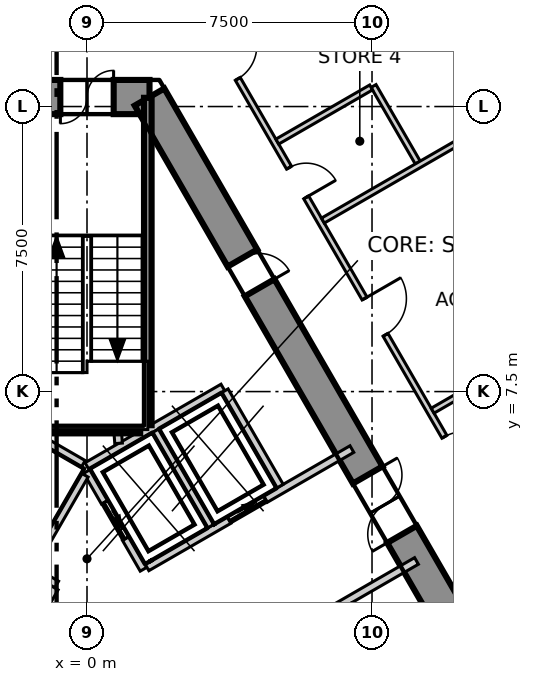
"""IFC4 building model, lengths in metres.
Left out: names, types, materials, properties, quantities, classifications, styles, units other than length and angle.
Written with IfcOpenShell. Run it as: python <this file> out.ifc"""

import sys

from ifc_helpers import new_model, si_unit, direction, frame, frame_2d, origin, place, context, subcontext, project, spatial, polyline, rectangle, outline, extrude, element, fill, save


model = new_model("IFC4")
c1 = context("Model", 3, precision=1e-05, world=origin(), true_north=direction((0.0, 1.0)))
c2 = subcontext(c1, "Body", "Model", "MODEL_VIEW")
j1 = project(units=[si_unit("LENGTHUNIT", "METRE"), si_unit("PLANEANGLEUNIT", "RADIAN")], contexts=[c1])
p1 = place(None, origin())
s1 = spatial("IfcSite", under=j1, at=p1, CompositionType="ELEMENT")
p2 = place(p1, origin())
s2 = spatial("IfcBuilding", under=s1, at=p2, CompositionType="ELEMENT")
p3 = place(p2, frame((0.0, 0.0, 71.3)))
s3 = spatial("IfcBuildingStorey", under=s2, at=p3, CompositionType="ELEMENT", Elevation=71.3)
p4 = place(p3, frame((1.645, 15.25, -0.3), z_axis=(0.0, 0.0, 1.0), x_axis=(-1.0, 0.0, 0.0)))
e1 = element("IfcWall", 1, at=p4, inside=s3, PredefinedType="SHEAR", context=c2, shape_type="SweptSolid", body=[
    extrude(outline(polyline([(-0.26, -0.45), (1.645, -0.45), (3.55, -0.45), (3.031, 0.45), (1.645, 0.45), (0.259, 0.45), (-0.26, -0.45)])), origin(), (0.0, 0.0, 1.0), 4.0),
])
p5 = place(p4, frame((0.945, 0.0, 0.3)))
e2 = element("IfcOpeningElement", 2, at=p5, cuts=e1, PredefinedType="OPENING", context=c2, shape_type="SweptSolid", body=[
    extrude(rectangle(XDim=1.4, YDim=2.1, at=frame_2d((0.7, 1.05))), frame((0.0, 0.46, 0.0), z_axis=(0.0, -1.0, 0.0), x_axis=(1.0, 0.0, 0.0)), (0.0, 0.0, 1.0), 0.92),
])
p6 = place(p3, frame((14.03, -6.2, -0.3), z_axis=(0.0, 0.0, 1.0), x_axis=(-0.500026485275, 0.866010111964, 0.0)))
e3 = element("IfcWall", 3, at=p6, inside=s3, PredefinedType="SHEAR", context=c2, shape_type="SweptSolid", body=[
    extrude(outline(polyline([(-0.26, -0.449), (1.685, -0.449), (3.63, -0.449), (5.576, -0.449), (7.521, -0.449), (9.466, -0.449), (11.411, -0.449), (13.357, -0.449), (15.302, -0.449), (17.247, -0.45), (19.192, -0.45), (21.138, -0.45), (23.083, -0.45), (25.028, -0.45), (24.509, 0.449), (22.644, 0.449), (20.778, 0.449), (18.913, 0.449), (17.048, 0.449), (15.182, 0.449), (13.317, 0.449), (11.452, 0.449), (9.587, 0.449), (7.721, 0.45), (5.856, 0.45), (3.991, 0.45), (2.125, 0.45), (0.26, 0.45), (-0.26, -0.449)])), origin(), (0.0, 0.0, 1.0), 4.0),
])
p7 = place(p6, frame((11.484, 0.0, 0.3)))
e4 = element("IfcOpeningElement", 4, at=p7, cuts=e3, PredefinedType="OPENING", context=c2, shape_type="SweptSolid", body=[
    extrude(rectangle(XDim=1.8, YDim=2.1, at=frame_2d((0.9, 1.05))), frame((0.0, 0.46, 0.0), z_axis=(0.0, -1.0, 0.0), x_axis=(1.0, 0.0, 0.0)), (0.0, 0.0, 1.0), 0.92),
])
p8 = place(p6, frame((4.892, 0.0, 0.3)))
e5 = element("IfcOpeningElement", 5, at=p8, cuts=e3, PredefinedType="OPENING", context=c2, shape_type="SweptSolid", body=[
    extrude(rectangle(XDim=0.9, YDim=2.1, at=frame_2d((0.45, 1.05))), frame((0.0, 0.46, 0.0), z_axis=(0.0, -1.0, 0.0), x_axis=(1.0, 0.0, 0.0)), (0.0, 0.0, 1.0), 0.92),
])
p9 = place(p6, frame((18.976, 0.0, 0.3)))
e6 = element("IfcOpeningElement", 6, at=p9, cuts=e3, PredefinedType="OPENING", context=c2, shape_type="SweptSolid", body=[
    extrude(rectangle(XDim=0.9, YDim=2.1, at=frame_2d((0.45, 1.05))), frame((0.0, 0.46, 0.0), z_axis=(0.0, -1.0, 0.0), x_axis=(1.0, 0.0, 0.0)), (0.0, 0.0, 1.0), 0.92),
])
p10 = place(p3, frame((33.779, -15.662, 0.0), z_axis=(0.0, 0.0, 1.0), x_axis=(-0.500000131003, 0.86602532815, 0.0)))
e7 = element("IfcWall", 7, at=p10, inside=s3, PredefinedType="ELEMENTEDWALL", context=c2, shape_type="SweptSolid", body=[
    extrude(rectangle(XDim=60.886, YDim=0.2, at=frame_2d((30.443, 0.0))), origin(), (0.0, 0.0, 1.0), 3.7),
])
p11 = place(p10, frame((2.147, 0.0, 0.9)))
e8 = element("IfcOpeningElement", 8, at=p11, cuts=e7, PredefinedType="OPENING", context=c2, shape_type="SweptSolid", body=[
    extrude(rectangle(XDim=5.6, YDim=2.5, at=frame_2d((2.8, 1.25))), frame((0.0, 0.11, 0.0), z_axis=(0.0, -1.0, 0.0), x_axis=(1.0, 0.0, 0.0)), (0.0, 0.0, 1.0), 0.22),
])
p12 = place(p10, frame((9.434, 0.0, 0.9)))
e9 = element("IfcOpeningElement", 9, at=p12, cuts=e7, PredefinedType="OPENING", context=c2, shape_type="SweptSolid", body=[
    extrude(rectangle(XDim=5.6, YDim=2.5, at=frame_2d((2.8, 1.25))), frame((0.0, 0.11, 0.0), z_axis=(0.0, -1.0, 0.0), x_axis=(1.0, 0.0, 0.0)), (0.0, 0.0, 1.0), 0.22),
])
p13 = place(p10, frame((16.722, 0.0, 0.9)))
e10 = element("IfcOpeningElement", 10, at=p13, cuts=e7, PredefinedType="OPENING", context=c2, shape_type="SweptSolid", body=[
    extrude(rectangle(XDim=5.6, YDim=2.5, at=frame_2d((2.8, 1.25))), frame((0.0, 0.11, 0.0), z_axis=(0.0, -1.0, 0.0), x_axis=(1.0, 0.0, 0.0)), (0.0, 0.0, 1.0), 0.22),
])
p14 = place(p10, frame((24.009, 0.0, 0.9)))
e11 = element("IfcOpeningElement", 11, at=p14, cuts=e7, PredefinedType="OPENING", context=c2, shape_type="SweptSolid", body=[
    extrude(rectangle(XDim=5.6, YDim=2.5, at=frame_2d((2.8, 1.25))), frame((0.0, 0.11, 0.0), z_axis=(0.0, -1.0, 0.0), x_axis=(1.0, 0.0, 0.0)), (0.0, 0.0, 1.0), 0.22),
])
p15 = place(p10, frame((31.297, 0.0, 0.9)))
e12 = element("IfcOpeningElement", 12, at=p15, cuts=e7, PredefinedType="OPENING", context=c2, shape_type="SweptSolid", body=[
    extrude(rectangle(XDim=5.6, YDim=2.5, at=frame_2d((2.8, 1.25))), frame((0.0, 0.11, 0.0), z_axis=(0.0, -1.0, 0.0), x_axis=(1.0, 0.0, 0.0)), (0.0, 0.0, 1.0), 0.22),
])
p16 = place(p10, frame((38.584, 0.0, 0.9)))
e13 = element("IfcOpeningElement", 13, at=p16, cuts=e7, PredefinedType="OPENING", context=c2, shape_type="SweptSolid", body=[
    extrude(rectangle(XDim=5.6, YDim=2.5, at=frame_2d((2.8, 1.25))), frame((0.0, 0.11, 0.0), z_axis=(0.0, -1.0, 0.0), x_axis=(1.0, 0.0, 0.0)), (0.0, 0.0, 1.0), 0.22),
])
p17 = place(p10, frame((45.872, 0.0, 0.9)))
e14 = element("IfcOpeningElement", 14, at=p17, cuts=e7, PredefinedType="OPENING", context=c2, shape_type="SweptSolid", body=[
    extrude(rectangle(XDim=5.6, YDim=2.5, at=frame_2d((2.8, 1.25))), frame((0.0, 0.11, 0.0), z_axis=(0.0, -1.0, 0.0), x_axis=(1.0, 0.0, 0.0)), (0.0, 0.0, 1.0), 0.22),
])
p18 = place(p10, frame((53.16, 0.0, 0.9)))
e15 = element("IfcOpeningElement", 15, at=p18, cuts=e7, PredefinedType="OPENING", context=c2, shape_type="SweptSolid", body=[
    extrude(rectangle(XDim=5.6, YDim=2.5, at=frame_2d((2.8, 1.25))), frame((0.0, 0.11, 0.0), z_axis=(0.0, -1.0, 0.0), x_axis=(1.0, 0.0, 0.0)), (0.0, 0.0, 1.0), 0.22),
])
p19 = place(p3, frame((-19.497, -11.17, 0.0), z_axis=(0.0, 0.0, 1.0), x_axis=(0.499998854553, 0.866026065108, 0.0)))
e16 = element("IfcWall", 16, at=p19, inside=s3, PredefinedType="PARTITIONING", context=c2, shape_type="SweptSolid", body=[
    extrude(rectangle(XDim=38.994, YDim=0.15, at=frame_2d((19.497, 0.0))), origin(), (0.0, 0.0, 1.0), 3.7),
])
p20 = place(p19, frame((35.944, 0.0, 0.0)))
e17 = element("IfcOpeningElement", 17, at=p20, cuts=e16, PredefinedType="OPENING", context=c2, shape_type="SweptSolid", body=[
    extrude(rectangle(XDim=1.1, YDim=2.1, at=frame_2d((0.55, 1.05))), frame((0.0, 0.085, 0.0), z_axis=(0.0, -1.0, 0.0), x_axis=(1.0, 0.0, 0.0)), (0.0, 0.0, 1.0), 0.17),
])
p21 = place(p19, frame((26.148, 0.0, 0.0)))
e18 = element("IfcOpeningElement", 18, at=p21, cuts=e16, PredefinedType="OPENING", context=c2, shape_type="SweptSolid", body=[
    extrude(rectangle(XDim=1.1, YDim=2.1, at=frame_2d((0.55, 1.05))), frame((0.0, 0.085, 0.0), z_axis=(0.0, -1.0, 0.0), x_axis=(1.0, 0.0, 0.0)), (0.0, 0.0, 1.0), 0.17),
])
p22 = place(p19, frame((8.572, 0.0, 0.0)))
e19 = element("IfcOpeningElement", 19, at=p22, cuts=e16, PredefinedType="OPENING", context=c2, shape_type="SweptSolid", body=[
    extrude(rectangle(XDim=1.1, YDim=2.1, at=frame_2d((0.55, 1.05))), frame((0.0, 0.085, 0.0), z_axis=(0.0, -1.0, 0.0), x_axis=(1.0, 0.0, 0.0)), (0.0, 0.0, 1.0), 0.17),
])
p23 = place(p19, frame((17.172, 0.0, 0.0)))
e20 = element("IfcOpeningElement", 20, at=p23, cuts=e16, PredefinedType="OPENING", context=c2, shape_type="SweptSolid", body=[
    extrude(rectangle(XDim=0.9, YDim=2.1, at=frame_2d((0.45, 1.05))), frame((0.0, 0.085, 0.0), z_axis=(0.0, -1.0, 0.0), x_axis=(1.0, 0.0, 0.0)), (0.0, 0.0, 1.0), 0.17),
])
p24 = place(p19, frame((14.172, 0.0, 0.0)))
e21 = element("IfcOpeningElement", 21, at=p24, cuts=e16, PredefinedType="OPENING", context=c2, shape_type="SweptSolid", body=[
    extrude(rectangle(XDim=0.9, YDim=2.1, at=frame_2d((0.45, 1.05))), frame((0.0, 0.085, 0.0), z_axis=(0.0, -1.0, 0.0), x_axis=(1.0, 0.0, 0.0)), (0.0, 0.0, 1.0), 0.17),
])
p25 = place(p19, frame((1.797, 0.0, 0.0)))
e22 = element("IfcOpeningElement", 22, at=p25, cuts=e16, PredefinedType="OPENING", context=c2, shape_type="SweptSolid", body=[
    extrude(rectangle(XDim=1.1, YDim=2.1, at=frame_2d((0.55, 1.05))), frame((0.0, 0.085, 0.0), z_axis=(0.0, -1.0, 0.0), x_axis=(1.0, 0.0, 0.0)), (0.0, 0.0, 1.0), 0.17),
])
p26 = place(p3, frame((0.075, 22.47, 0.0), z_axis=(0.0, 0.0, 1.0), x_axis=(0.500002280369, -0.866024087209, 0.0)))
e23 = element("IfcWall", 23, at=p26, inside=s3, PredefinedType="PARTITIONING", context=c2, shape_type="SweptSolid", body=[
    extrude(rectangle(XDim=38.844, YDim=0.15, at=frame_2d((19.422, 0.0))), origin(), (0.0, 0.0, 1.0), 3.7),
])
p27 = place(p26, frame((35.944, 0.0, 0.0)))
e24 = element("IfcOpeningElement", 24, at=p27, cuts=e23, PredefinedType="OPENING", context=c2, shape_type="SweptSolid", body=[
    extrude(rectangle(XDim=1.1, YDim=2.1, at=frame_2d((0.55, 1.05))), frame((0.0, 0.085, 0.0), z_axis=(0.0, -1.0, 0.0), x_axis=(1.0, 0.0, 0.0)), (0.0, 0.0, 1.0), 0.17),
])
p28 = place(p26, frame((29.848, 0.0, 0.0)))
e25 = element("IfcOpeningElement", 25, at=p28, cuts=e23, PredefinedType="OPENING", context=c2, shape_type="SweptSolid", body=[
    extrude(rectangle(XDim=1.0, YDim=2.1, at=frame_2d((0.5, 1.05))), frame((0.0, 0.085, 0.0), z_axis=(0.0, -1.0, 0.0), x_axis=(1.0, 0.0, 0.0)), (0.0, 0.0, 1.0), 0.17),
])
p29 = place(p26, frame((14.46, 0.0, 0.0)))
e26 = element("IfcOpeningElement", 26, at=p29, cuts=e23, PredefinedType="OPENING", context=c2, shape_type="SweptSolid", body=[
    extrude(rectangle(XDim=1.1, YDim=2.1, at=frame_2d((0.55, 1.05))), frame((0.0, 0.085, 0.0), z_axis=(0.0, -1.0, 0.0), x_axis=(1.0, 0.0, 0.0)), (0.0, 0.0, 1.0), 0.17),
])
p30 = place(p26, frame((24.66, 0.0, 0.0)))
e27 = element("IfcOpeningElement", 27, at=p30, cuts=e23, PredefinedType="OPENING", context=c2, shape_type="SweptSolid", body=[
    extrude(rectangle(XDim=0.9, YDim=2.1, at=frame_2d((0.45, 1.05))), frame((0.0, 0.085, 0.0), z_axis=(0.0, -1.0, 0.0), x_axis=(1.0, 0.0, 0.0)), (0.0, 0.0, 1.0), 0.17),
])
p31 = place(p26, frame((21.46, 0.0, 0.0)))
e28 = element("IfcOpeningElement", 28, at=p31, cuts=e23, PredefinedType="OPENING", context=c2, shape_type="SweptSolid", body=[
    extrude(rectangle(XDim=0.9, YDim=2.1, at=frame_2d((0.45, 1.05))), frame((0.0, 0.085, 0.0), z_axis=(0.0, -1.0, 0.0), x_axis=(1.0, 0.0, 0.0)), (0.0, 0.0, 1.0), 0.17),
])
p32 = place(p26, frame((18.66, 0.0, 0.0)))
e29 = element("IfcOpeningElement", 29, at=p32, cuts=e23, PredefinedType="OPENING", context=c2, shape_type="SweptSolid", body=[
    extrude(rectangle(XDim=1.0, YDim=2.1, at=frame_2d((0.5, 1.05))), frame((0.0, 0.085, 0.0), z_axis=(0.0, -1.0, 0.0), x_axis=(1.0, 0.0, 0.0)), (0.0, 0.0, 1.0), 0.17),
])
p33 = place(p26, frame((6.785, 0.0, 0.0)))
e30 = element("IfcOpeningElement", 30, at=p33, cuts=e23, PredefinedType="OPENING", context=c2, shape_type="SweptSolid", body=[
    extrude(rectangle(XDim=1.0, YDim=2.1, at=frame_2d((0.5, 1.05))), frame((0.0, 0.085, 0.0), z_axis=(0.0, -1.0, 0.0), x_axis=(1.0, 0.0, 0.0)), (0.0, 0.0, 1.0), 0.17),
])
p34 = place(p26, frame((10.485, 0.0, 0.0)))
e31 = element("IfcOpeningElement", 31, at=p34, cuts=e23, PredefinedType="OPENING", context=c2, shape_type="SweptSolid", body=[
    extrude(rectangle(XDim=0.9, YDim=2.1, at=frame_2d((0.45, 1.05))), frame((0.0, 0.085, 0.0), z_axis=(0.0, -1.0, 0.0), x_axis=(1.0, 0.0, 0.0)), (0.0, 0.0, 1.0), 0.17),
])
p35 = place(p26, frame((1.796, 0.0, 0.0)))
e32 = element("IfcOpeningElement", 32, at=p35, cuts=e23, PredefinedType="OPENING", context=c2, shape_type="SweptSolid", body=[
    extrude(rectangle(XDim=1.1, YDim=2.1, at=frame_2d((0.55, 1.05))), frame((0.0, 0.085, 0.0), z_axis=(0.0, -1.0, 0.0), x_axis=(1.0, 0.0, 0.0)), (0.0, 0.0, 1.0), 0.17),
])
p36 = place(p3, frame((7.54, 15.54, 0.0), z_axis=(0.0, 0.0, 1.0), x_axis=(0.499988999718, -0.866031754707, 0.0)))
e33 = element("IfcWall", 33, at=p36, inside=s3, PredefinedType="PARTITIONING", context=c2, shape_type="SweptSolid", body=[
    extrude(rectangle(XDim=2.326, YDim=0.15, at=frame_2d((1.163, 0.0))), origin(), (0.0, 0.0, 1.0), 3.7),
])
p37 = place(p3, frame((5.007, 14.077, 0.0), z_axis=(0.0, 0.0, 1.0), x_axis=(0.866090043625, 0.499888023795, 0.0)))
e34 = element("IfcWall", 34, at=p37, inside=s3, PredefinedType="PARTITIONING", context=c2, shape_type="SweptSolid", body=[
    extrude(rectangle(XDim=2.851, YDim=0.15, at=frame_2d((1.425, 0.0))), origin(), (0.0, 0.0, 1.0), 3.7),
])
p38 = place(p3, frame((6.207, 11.999, 0.0), z_axis=(0.0, 0.0, 1.0), x_axis=(0.866061182393, 0.499938024511, 0.0)))
e35 = element("IfcWall", 35, at=p38, inside=s3, PredefinedType="PARTITIONING", context=c2, shape_type="SweptSolid", body=[
    extrude(rectangle(XDim=9.967, YDim=0.15, at=frame_2d((4.983, 0.0))), origin(), (0.0, 0.0, 1.0), 3.7),
])
p39 = place(p3, frame((9.095, 6.997, 0.0), z_axis=(0.0, 0.0, 1.0), x_axis=(0.866061862632, 0.499936846106, 0.0)))
e36 = element("IfcWall", 36, at=p39, inside=s3, PredefinedType="PARTITIONING", context=c2, shape_type="SweptSolid", body=[
    extrude(rectangle(XDim=3.45, YDim=0.15, at=frame_2d((1.725, 0.0))), origin(), (0.0, 0.0, 1.0), 3.7),
])
p40 = place(p3, frame((-0.002, 5.541, 0.0), z_axis=(0.0, 0.0, 1.0), x_axis=(0.86600155993, 0.500041296494, 0.0)))
e37 = element("IfcWall", 37, at=p40, inside=s3, PredefinedType="SOLIDWALL", context=c2, shape_type="SweptSolid", body=[
    extrude(rectangle(XDim=4.132, YDim=0.2, at=frame_2d((2.066, 0.0))), origin(), (0.0, 0.0, 1.0), 3.7),
])
p41 = place(p3, frame((0.0, 5.4, 0.0), z_axis=(0.0, 0.0, 1.0), x_axis=(0.500103862429, -0.865965430478, 0.0)))
e38 = element("IfcWall", 38, at=p41, inside=s3, PredefinedType="SOLIDWALL", context=c2, shape_type="SweptSolid", body=[
    extrude(rectangle(XDim=2.973, YDim=0.2, at=frame_2d((1.487, 0.0))), origin(), (0.0, 0.0, 1.0), 3.7),
])
p42 = place(p41, frame((0.937, 0.0, 0.0)))
e39 = element("IfcOpeningElement", 39, at=p42, cuts=e38, PredefinedType="OPENING", context=c2, shape_type="SweptSolid", body=[
    extrude(rectangle(XDim=1.1, YDim=2.1, at=frame_2d((0.55, 1.05))), frame((0.0, 0.11, 0.0), z_axis=(0.0, -1.0, 0.0), x_axis=(1.0, 0.0, 0.0)), (0.0, 0.0, 1.0), 0.22),
])
p43 = place(p3, frame((1.578, 2.874, 0.0), z_axis=(0.0, 0.0, 1.0), x_axis=(0.866031483044, 0.499989470266, 0.0)))
e40 = element("IfcWall", 40, at=p43, inside=s3, PredefinedType="SOLIDWALL", context=c2, shape_type="SweptSolid", body=[
    extrude(rectangle(XDim=6.226, YDim=0.2, at=frame_2d((3.113, 0.0))), origin(), (0.0, 0.0, 1.0), 3.7),
])
p44 = place(p43, frame((2.496, 0.0, 0.0)))
e41 = element("IfcOpeningElement", 41, at=p44, cuts=e40, PredefinedType="OPENING", context=c2, shape_type="SweptSolid", body=[
    extrude(rectangle(XDim=1.1, YDim=2.1, at=frame_2d((0.55, 1.05))), frame((0.0, 0.11, 0.0), z_axis=(0.0, -1.0, 0.0), x_axis=(1.0, 0.0, 0.0)), (0.0, 0.0, 1.0), 0.22),
])
p45 = place(p3, frame((3.278, -0.071, 0.0), z_axis=(0.0, 0.0, 1.0), x_axis=(0.865953757655, 0.500124074208, 0.0)))
e42 = element("IfcWall", 42, at=p45, inside=s3, PredefinedType="SOLIDWALL", context=c2, shape_type="SweptSolid", body=[
    extrude(rectangle(XDim=6.227, YDim=0.2, at=frame_2d((3.113, 0.0))), origin(), (0.0, 0.0, 1.0), 3.7),
])
for number, where, z_axis, x_axis in (
    (43, (3.626, 7.52, 0.0), (0.0, 0.0, 1.0), (0.5, -0.866, 0.0)),
    (44, (1.807, 6.47, 0.0), (0.0, 0.0, 1.0), (0.5, -0.866, 0.0)),
):
    element("IfcWall", number, at=place(p3, frame(where, z_axis=z_axis, x_axis=x_axis)), inside=s3, PredefinedType="SOLIDWALL", context=c2, shape_type="SweptSolid", body=[
        extrude(rectangle(XDim=2.9, YDim=0.2, at=frame_2d((1.45, 0.0))), origin(), (0.0, 0.0, 1.0), 3.7),
    ])
p46 = place(p3, frame((-1.488, 2.822, 0.0), z_axis=(0.0, 0.0, 1.0), x_axis=(0.866236612152, -0.499633997809, 0.0)))
e45 = element("IfcWall", 45, at=p46, inside=s3, PredefinedType="SOLIDWALL", context=c2, shape_type="SweptSolid", body=[
    extrude(rectangle(XDim=0.796, YDim=0.2, at=frame_2d((0.398, 0.0))), origin(), (0.0, 0.0, 1.0), 3.7),
])
p47 = place(p3, frame((-2.444, -0.433, 0.0), z_axis=(0.0, 0.0, 1.0), x_axis=(0.500035624827, 0.866004834804, 0.0)))
e46 = element("IfcWall", 46, at=p47, inside=s3, PredefinedType="SOLIDWALL", context=c2, shape_type="SweptSolid", body=[
    extrude(rectangle(XDim=3.194, YDim=0.2, at=frame_2d((1.597, 0.0))), origin(), (0.0, 0.0, 1.0), 3.7),
])
p48 = place(p3, frame((-1.67, 6.507, 0.0), z_axis=(0.0, 0.0, 1.0), x_axis=(0.865941441609, -0.500145398563, 0.0)))
e47 = element("IfcWall", 47, at=p48, inside=s3, PredefinedType="SOLIDWALL", context=c2, shape_type="SweptSolid", body=[
    extrude(rectangle(XDim=1.815, YDim=0.2, at=frame_2d((0.908, 0.0))), origin(), (0.0, 0.0, 1.0), 3.7),
])
p49 = place(p3, frame((-1.438, 2.909, 0.0), z_axis=(0.0, 0.0, 1.0), x_axis=(0.499829630636, 0.866123744241, 0.0)))
e48 = element("IfcWall", 48, at=p49, inside=s3, PredefinedType="SOLIDWALL", context=c2, shape_type="SweptSolid", body=[
    extrude(rectangle(XDim=2.761, YDim=0.2, at=frame_2d((1.38, 0.0))), origin(), (0.0, 0.0, 1.0), 3.7),
])
p50 = place(p3, frame((0.811, 6.4, 0.0), z_axis=(0.0, 0.0, 1.0), x_axis=(0.076199063602, -0.997092624938, 0.0)))
e49 = element("IfcWall", 49, at=p50, inside=s3, PredefinedType="SOLIDWALL", context=c2, shape_type="SweptSolid", body=[
    extrude(rectangle(XDim=0.263, YDim=0.2, at=frame_2d((0.131, 0.0))), origin(), (0.0, 0.0, 1.0), 3.7),
])
p51 = place(p3, frame((1.6, 6.615, 0.0), z_axis=(0.0, 0.0, 1.0), x_axis=(0.0, 1.0, 0.0)))
e50 = element("IfcWall", 50, at=p51, inside=s3, PredefinedType="SOLIDWALL", context=c2, shape_type="SweptSolid", body=[
    extrude(rectangle(XDim=8.615, YDim=0.2, at=frame_2d((4.308, 0.0))), origin(), (0.0, 0.0, 1.0), 3.7),
])
p52 = place(p3, frame((-1.4, 6.5, 0.0), z_axis=(0.0, 0.0, 1.0), x_axis=(1.0, 0.0, 0.0)))
e51 = element("IfcWall", 51, at=p52, inside=s3, PredefinedType="SOLIDWALL", context=c2, shape_type="SweptSolid", body=[
    extrude(rectangle(XDim=2.8, YDim=0.2, at=frame_2d((1.4, 0.0))), origin(), (0.0, 0.0, 1.0), 3.7),
])
p53 = place(p42, origin())
e52 = element("IfcDoor", 52, at=p53, inside=s3, OperationType="SLIDING_TO_LEFT", PredefinedType="DOOR", context=c2, shape_type="SweptSolid", body=[
    extrude(rectangle(XDim=1.1, YDim=2.1, at=frame_2d((0.55, 1.05))), frame((0.0, 0.025, 0.0), z_axis=(0.0, -1.0, 0.0), x_axis=(1.0, 0.0, 0.0)), (0.0, 0.0, 1.0), 0.05),
])
fill(e39, e52)
p54 = place(p44, origin())
e53 = element("IfcDoor", 53, at=p54, inside=s3, OperationType="SLIDING_TO_LEFT", PredefinedType="DOOR", context=c2, shape_type="SweptSolid", body=[
    extrude(rectangle(XDim=1.1, YDim=2.1, at=frame_2d((0.55, 1.05))), frame((0.0, 0.025, 0.0), z_axis=(0.0, -1.0, 0.0), x_axis=(1.0, 0.0, 0.0)), (0.0, 0.0, 1.0), 0.05),
])
fill(e41, e53)
p55 = place(p29, origin())
e54 = element("IfcDoor", 54, at=p55, inside=s3, OperationType="SINGLE_SWING_RIGHT", PredefinedType="DOOR", context=c2, shape_type="SweptSolid", body=[
    extrude(rectangle(XDim=1.1, YDim=2.1, at=frame_2d((0.55, 1.05))), frame((0.0, 0.025, 0.0), z_axis=(0.0, -1.0, 0.0), x_axis=(1.0, 0.0, 0.0)), (0.0, 0.0, 1.0), 0.05),
])
fill(e26, e54)
p56 = place(p32, origin())
e55 = element("IfcDoor", 55, at=p56, inside=s3, OperationType="SINGLE_SWING_LEFT", PredefinedType="DOOR", context=c2, shape_type="SweptSolid", body=[
    extrude(rectangle(XDim=1.0, YDim=2.1, at=frame_2d((0.5, 1.05))), frame((0.0, 0.025, 0.0), z_axis=(0.0, -1.0, 0.0), x_axis=(1.0, 0.0, 0.0)), (0.0, 0.0, 1.0), 0.05),
])
fill(e29, e55)
p57 = place(p33, origin())
e56 = element("IfcDoor", 56, at=p57, inside=s3, OperationType="SINGLE_SWING_RIGHT", PredefinedType="DOOR", context=c2, shape_type="SweptSolid", body=[
    extrude(rectangle(XDim=1.0, YDim=2.1, at=frame_2d((0.5, 1.05))), frame((0.0, 0.025, 0.0), z_axis=(0.0, -1.0, 0.0), x_axis=(1.0, 0.0, 0.0)), (0.0, 0.0, 1.0), 0.05),
])
fill(e30, e56)
p58 = place(p34, origin())
e57 = element("IfcDoor", 57, at=p58, inside=s3, OperationType="SINGLE_SWING_LEFT", PredefinedType="DOOR", context=c2, shape_type="SweptSolid", body=[
    extrude(rectangle(XDim=0.9, YDim=2.1, at=frame_2d((0.45, 1.05))), frame((0.0, 0.025, 0.0), z_axis=(0.0, -1.0, 0.0), x_axis=(1.0, 0.0, 0.0)), (0.0, 0.0, 1.0), 0.05),
])
fill(e31, e57)
p59 = place(p7, origin())
e58 = element("IfcDoor", 58, at=p59, inside=s3, OperationType="DOUBLE_DOOR_SINGLE_SWING", PredefinedType="DOOR", context=c2, shape_type="SweptSolid", body=[
    extrude(rectangle(XDim=1.8, YDim=2.1, at=frame_2d((0.9, 1.05))), frame((0.0, 0.025, 0.0), z_axis=(0.0, -1.0, 0.0), x_axis=(1.0, 0.0, 0.0)), (0.0, 0.0, 1.0), 0.05),
])
fill(e4, e58)
p60 = place(p5, origin())
e59 = element("IfcDoor", 59, at=p60, inside=s3, OperationType="DOUBLE_DOOR_SINGLE_SWING", PredefinedType="DOOR", context=c2, shape_type="SweptSolid", body=[
    extrude(rectangle(XDim=1.4, YDim=2.1, at=frame_2d((0.7, 1.05))), frame((0.0, 0.025, 0.0), z_axis=(0.0, -1.0, 0.0), x_axis=(1.0, 0.0, 0.0)), (0.0, 0.0, 1.0), 0.05),
])
fill(e2, e59)
p61 = place(p9, origin())
e60 = element("IfcDoor", 60, at=p61, inside=s3, OperationType="SINGLE_SWING_LEFT", PredefinedType="DOOR", context=c2, shape_type="SweptSolid", body=[
    extrude(rectangle(XDim=0.9, YDim=2.1, at=frame_2d((0.45, 1.05))), frame((0.0, 0.025, 0.0), z_axis=(0.0, -1.0, 0.0), x_axis=(1.0, 0.0, 0.0)), (0.0, 0.0, 1.0), 0.05),
])
fill(e6, e60)
save(model, sys.argv[1])
